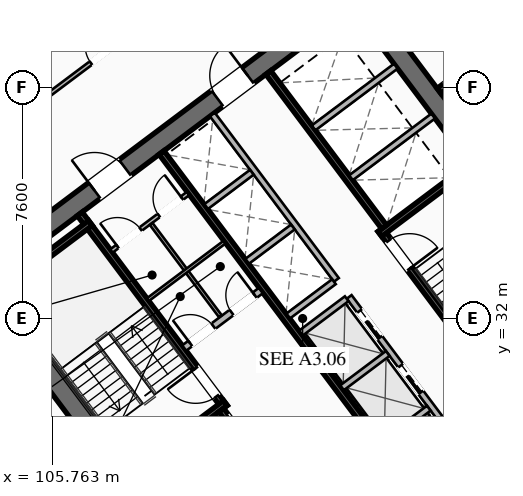
"""IFC4 building model, lengths in metres.
Left out: names, types, materials, properties, quantities, classifications, styles, units other than length and angle.
Written with IfcOpenShell. Run it as: python <this file> out.ifc"""

import sys

from ifc_helpers import new_model, si_unit, direction, frame, frame_2d, origin, place, context, subcontext, project, spatial, rectangle, extrude, element, fill, save


model = new_model("IFC4")
c1 = context("Model", 3, precision=1e-05, world=origin(), true_north=direction((0.0, 1.0)))
c2 = subcontext(c1, "Body", "Model", "MODEL_VIEW")
j1 = project(units=[si_unit("LENGTHUNIT", "METRE"), si_unit("PLANEANGLEUNIT", "RADIAN")], contexts=[c1])
p1 = place(None, origin())
s1 = spatial("IfcSite", under=j1, at=p1, CompositionType="ELEMENT")
p2 = place(p1, origin())
s2 = spatial("IfcBuilding", under=s1, at=p2, CompositionType="ELEMENT")
p3 = place(p2, frame((0.0, 0.0, 102.7)))
s3 = spatial("IfcBuildingStorey", under=s2, at=p3, CompositionType="ELEMENT", Elevation=102.7)
for number, where, z_axis, x_axis in (
    (1, (112.476, 21.107, 0.0), (0.0, 0.0, 1.0), (-0.6, 0.8, 0.0)),
    (2, (115.524, 42.893, 0.0), (0.0, 0.0, 1.0), (0.6, -0.8, 0.0)),
):
    element("IfcWall", number, at=place(p3, frame(where, z_axis=z_axis, x_axis=x_axis)), inside=s3, PredefinedType="SHEAR", context=c2, shape_type="SweptSolid", body=[
        extrude(rectangle(XDim=15.6, YDim=0.65, at=frame_2d((7.8, 0.0))), origin(), (0.0, 0.0, 1.0), 3.55),
    ])
p4 = place(p3, frame((124.429, 30.478, 0.0), z_axis=(0.0, 0.0, 1.0), x_axis=(-0.799998028465, -0.600002628705, 0.0)))
e3 = element("IfcWall", 3, at=p4, inside=s3, PredefinedType="SHEAR", context=c2, shape_type="SweptSolid", body=[
    extrude(rectangle(XDim=14.86, YDim=0.65, at=frame_2d((7.43, 0.0))), origin(), (0.0, 0.0, 1.0), 3.55),
])
p5 = place(p4, frame((9.13, 0.0, 0.0)))
e4 = element("IfcOpeningElement", 4, at=p5, cuts=e3, PredefinedType="OPENING", context=c2, shape_type="SweptSolid", body=[
    extrude(rectangle(XDim=1.25, YDim=2.25, at=frame_2d((0.625, 1.125))), frame((0.0, 0.335, 0.0), z_axis=(0.0, -1.0, 0.0), x_axis=(1.0, 0.0, 0.0)), (0.0, 0.0, 1.0), 0.67),
])
p6 = place(p4, frame((4.08, 0.0, 0.0)))
e5 = element("IfcOpeningElement", 5, at=p6, cuts=e3, PredefinedType="OPENING", context=c2, shape_type="SweptSolid", body=[
    extrude(rectangle(XDim=1.25, YDim=2.25, at=frame_2d((0.625, 1.125))), frame((0.0, 0.335, 0.0), z_axis=(0.0, -1.0, 0.0), x_axis=(1.0, 0.0, 0.0)), (0.0, 0.0, 1.0), 0.67),
])
p7 = place(p3, frame((103.571, 33.522, 0.0), z_axis=(0.0, 0.0, 1.0), x_axis=(0.799998028465, 0.600002628705, 0.0)))
e6 = element("IfcWall", 6, at=p7, inside=s3, PredefinedType="SHEAR", context=c2, shape_type="SweptSolid", body=[
    extrude(rectangle(XDim=14.86, YDim=0.65, at=frame_2d((7.43, 0.0))), origin(), (0.0, 0.0, 1.0), 3.55),
])
p8 = place(p7, frame((4.48, 0.0, 0.0)))
e7 = element("IfcOpeningElement", 7, at=p8, cuts=e6, PredefinedType="OPENING", context=c2, shape_type="SweptSolid", body=[
    extrude(rectangle(XDim=1.25, YDim=2.25, at=frame_2d((0.625, 1.125))), frame((0.0, 0.335, 0.0), z_axis=(0.0, -1.0, 0.0), x_axis=(1.0, 0.0, 0.0)), (0.0, 0.0, 1.0), 0.67),
])
p9 = place(p7, frame((9.53, 0.0, 0.0)))
e8 = element("IfcOpeningElement", 8, at=p9, cuts=e6, PredefinedType="OPENING", context=c2, shape_type="SweptSolid", body=[
    extrude(rectangle(XDim=1.25, YDim=2.25, at=frame_2d((0.625, 1.125))), frame((0.0, 0.335, 0.0), z_axis=(0.0, -1.0, 0.0), x_axis=(1.0, 0.0, 0.0)), (0.0, 0.0, 1.0), 0.67),
])
p10 = place(p3, frame((111.44, 29.08, 0.0), z_axis=(0.0, 0.0, 1.0), x_axis=(-0.600009827119, 0.799992629566, 0.0)))
e9 = element("IfcWall", 9, at=p10, inside=s3, PredefinedType="SHEAR", context=c2, shape_type="SweptSolid", body=[
    extrude(rectangle(XDim=7.95, YDim=0.2, at=frame_2d((3.975, 0.0))), origin(), (0.0, 0.0, 1.0), 3.35),
])
p11 = place(p10, frame((0.45, 0.0, 0.0)))
e10 = element("IfcOpeningElement", 10, at=p11, cuts=e9, PredefinedType="OPENING", context=c2, shape_type="SweptSolid", body=[
    extrude(rectangle(XDim=1.15, YDim=2.2, at=frame_2d((0.575, 1.1))), frame((0.0, 0.11, 0.0), z_axis=(0.0, -1.0, 0.0), x_axis=(1.0, 0.0, 0.0)), (0.0, 0.0, 1.0), 0.22),
])
for number, where, z_axis, x_axis in (
    (11, (108.476, 26.982, 0.0), (0.0, 0.0, 1.0), (0.8, 0.6, 0.0)),
    (12, (104.036, 32.902, 0.0), (0.0, 0.0, 1.0), (0.8, 0.6, 0.0)),
):
    element("IfcWall", number, at=place(p3, frame(where, z_axis=z_axis, x_axis=x_axis)), inside=s3, PredefinedType="SHEAR", context=c2, shape_type="SweptSolid", body=[
        extrude(rectangle(XDim=3.73, YDim=0.2, at=frame_2d((1.865, 0.0))), origin(), (0.0, 0.0, 1.0), 3.35),
    ])
p12 = place(p3, frame((116.56, 34.92, 0.0), z_axis=(0.0, 0.0, 1.0), x_axis=(0.600009827119, -0.799992629566, 0.0)))
e13 = element("IfcWall", 13, at=p12, inside=s3, PredefinedType="SHEAR", context=c2, shape_type="SweptSolid", body=[
    extrude(rectangle(XDim=7.95, YDim=0.2, at=frame_2d((3.975, 0.0))), origin(), (0.0, 0.0, 1.0), 3.35),
])
p13 = place(p12, frame((0.45, 0.0, 0.0)))
e14 = element("IfcOpeningElement", 14, at=p13, cuts=e13, PredefinedType="OPENING", context=c2, shape_type="SweptSolid", body=[
    extrude(rectangle(XDim=1.15, YDim=2.2, at=frame_2d((0.575, 1.1))), frame((0.0, 0.11, 0.0), z_axis=(0.0, -1.0, 0.0), x_axis=(1.0, 0.0, 0.0)), (0.0, 0.0, 1.0), 0.22),
])
p14 = place(p3, frame((116.54, 34.78, 0.0), z_axis=(0.0, 0.0, 1.0), x_axis=(0.799984290658, 0.600020945218, 0.0)))
e15 = element("IfcWall", 15, at=p14, inside=s3, PredefinedType="SHEAR", context=c2, shape_type="SweptSolid", body=[
    extrude(rectangle(XDim=3.73, YDim=0.2, at=frame_2d((1.865, 0.0))), origin(), (0.0, 0.0, 1.0), 3.35),
])
p15 = place(p3, frame((117.938, 26.016, 0.0), z_axis=(0.0, 0.0, 1.0), x_axis=(-0.600005463273, 0.799995902516, 0.0)))
e16 = element("IfcWall", 16, at=p15, inside=s3, PredefinedType="SHEAR", context=c2, shape_type="SweptSolid", body=[
    extrude(rectangle(XDim=14.3, YDim=0.2, at=frame_2d((7.15, 0.0))), origin(), (0.0, 0.0, 1.0), 3.35),
])
p16 = place(p3, frame((110.104, 31.028, 0.0), z_axis=(0.0, 0.0, 1.0), x_axis=(0.800018601094, 0.59997519774, 0.0)))
e17 = element("IfcWall", 17, at=p16, inside=s3, PredefinedType="SOLIDWALL", context=c2, shape_type="SweptSolid", body=[
    extrude(rectangle(XDim=3.15, YDim=0.22, at=frame_2d((1.575, 0.0))), origin(), (0.0, 0.0, 1.0), 2.703),
])
p17 = place(p16, frame((0.25, 0.0, 0.0)))
e18 = element("IfcOpeningElement", 18, at=p17, cuts=e17, PredefinedType="OPENING", context=c2, shape_type="SweptSolid", body=[
    extrude(rectangle(XDim=0.95, YDim=2.05, at=frame_2d((0.475, 1.025))), frame((0.0, 0.12, 0.0), z_axis=(0.0, -1.0, 0.0), x_axis=(1.0, 0.0, 0.0)), (0.0, 0.0, 1.0), 0.24),
])
p18 = place(p16, frame((1.95, 0.0, 0.0)))
e19 = element("IfcOpeningElement", 19, at=p18, cuts=e17, PredefinedType="OPENING", context=c2, shape_type="SweptSolid", body=[
    extrude(rectangle(XDim=0.95, YDim=2.05, at=frame_2d((0.475, 1.025))), frame((0.0, 0.12, 0.0), z_axis=(0.0, -1.0, 0.0), x_axis=(1.0, 0.0, 0.0)), (0.0, 0.0, 1.0), 0.24),
])
p19 = place(p3, frame((115.13, 23.91, 0.0), z_axis=(0.0, 0.0, 1.0), x_axis=(-0.599975393228, 0.800018454488, 0.0)))
e20 = element("IfcWall", 20, at=p19, inside=s3, PredefinedType="SHEAR", context=c2, shape_type="SweptSolid", body=[
    extrude(rectangle(XDim=6.35, YDim=0.2, at=frame_2d((3.175, 0.0))), origin(), (0.0, 0.0, 1.0), 3.35),
])
p20 = place(p19, frame((4.775, 0.0, 0.0)))
e21 = element("IfcOpeningElement", 21, at=p20, cuts=e20, PredefinedType="OPENING", context=c2, shape_type="SweptSolid", body=[
    extrude(rectangle(XDim=1.3, YDim=2.25, at=frame_2d((0.65, 1.125))), frame((0.0, 0.11, 0.0), z_axis=(0.0, -1.0, 0.0), x_axis=(1.0, 0.0, 0.0)), (0.0, 0.0, 1.0), 0.22),
])
p21 = place(p19, frame((2.775, 0.0, 0.0)))
e22 = element("IfcOpeningElement", 22, at=p21, cuts=e20, PredefinedType="OPENING", context=c2, shape_type="SweptSolid", body=[
    extrude(rectangle(XDim=1.3, YDim=2.25, at=frame_2d((0.65, 1.125))), frame((0.0, 0.11, 0.0), z_axis=(0.0, -1.0, 0.0), x_axis=(1.0, 0.0, 0.0)), (0.0, 0.0, 1.0), 0.22),
])
p22 = place(p19, frame((0.575, 0.0, 0.0)))
e23 = element("IfcOpeningElement", 23, at=p22, cuts=e20, PredefinedType="OPENING", context=c2, shape_type="SweptSolid", body=[
    extrude(rectangle(XDim=1.3, YDim=2.25, at=frame_2d((0.65, 1.125))), frame((0.0, 0.11, 0.0), z_axis=(0.0, -1.0, 0.0), x_axis=(1.0, 0.0, 0.0)), (0.0, 0.0, 1.0), 0.22),
])
p23 = place(p3, frame((112.87, 40.09, 0.0), z_axis=(0.0, 0.0, 1.0), x_axis=(0.599975393228, -0.800018454488, 0.0)))
e24 = element("IfcWall", 24, at=p23, inside=s3, PredefinedType="SHEAR", context=c2, shape_type="SweptSolid", body=[
    extrude(rectangle(XDim=6.35, YDim=0.2, at=frame_2d((3.175, 0.0))), origin(), (0.0, 0.0, 1.0), 3.35),
])
for number, where, z_axis, x_axis in (
    (25, (115.59, 36.63, 0.0), (0.0, 0.0, 1.0), (0.8, 0.6, 0.0)),
    (26, (114.36, 38.27, 0.0), (0.0, 0.0, 1.0), (0.8, 0.6, 0.0)),
):
    element("IfcWall", number, at=place(p3, frame(where, z_axis=z_axis, x_axis=x_axis)), inside=s3, PredefinedType="SOLIDWALL", context=c2, shape_type="SweptSolid", body=[
        extrude(rectangle(XDim=3.38, YDim=0.2, at=frame_2d((1.69, 0.0))), origin(), (0.0, 0.0, 1.0), 3.35),
    ])
p24 = place(p3, frame((107.71, 34.22, 0.0), z_axis=(0.0, 0.0, 1.0), x_axis=(0.799981399002, 0.60002480053, 0.0)))
e27 = element("IfcWall", 27, at=p24, inside=s3, PredefinedType="PARTITIONING", context=c2, shape_type="SweptSolid", body=[
    extrude(rectangle(XDim=3.15, YDim=0.135, at=frame_2d((1.575, 0.0))), origin(), (0.0, 0.0, 1.0), 2.703),
])
p25 = place(p24, frame((0.25, 0.0, 0.0)))
e28 = element("IfcOpeningElement", 28, at=p25, cuts=e27, PredefinedType="OPENING", context=c2, shape_type="SweptSolid", body=[
    extrude(rectangle(XDim=0.95, YDim=2.05, at=frame_2d((0.475, 1.025))), frame((0.0, 0.077, 0.0), z_axis=(0.0, -1.0, 0.0), x_axis=(1.0, 0.0, 0.0)), (0.0, 0.0, 1.0), 0.155),
])
p26 = place(p24, frame((1.95, 0.0, 0.0)))
e29 = element("IfcOpeningElement", 29, at=p26, cuts=e27, PredefinedType="OPENING", context=c2, shape_type="SweptSolid", body=[
    extrude(rectangle(XDim=0.95, YDim=2.05, at=frame_2d((0.475, 1.025))), frame((0.0, 0.077, 0.0), z_axis=(0.0, -1.0, 0.0), x_axis=(1.0, 0.0, 0.0)), (0.0, 0.0, 1.0), 0.155),
])
p27 = place(p3, frame((111.296, 32.072, 0.0), z_axis=(0.0, 0.0, 1.0), x_axis=(-0.59995887973, 0.800030838552, 0.0)))
e30 = element("IfcWall", 30, at=p27, inside=s3, PredefinedType="PARTITIONING", context=c2, shape_type="SweptSolid", body=[
    extrude(rectangle(XDim=3.8, YDim=0.11, at=frame_2d((1.9, 0.0))), origin(), (0.0, 0.0, 1.0), 2.703),
])
p28 = place(p3, frame((108.91, 32.62, 0.0), z_axis=(0.0, 0.0, 1.0), x_axis=(0.800018601094, 0.59997519774, 0.0)))
e31 = element("IfcWall", 31, at=p28, inside=s3, PredefinedType="PARTITIONING", context=c2, shape_type="SweptSolid", body=[
    extrude(rectangle(XDim=3.15, YDim=0.11, at=frame_2d((1.575, 0.0))), origin(), (0.0, 0.0, 1.0), 2.703),
])
p29 = place(p3, frame((119.61, 27.27, 0.0), z_axis=(0.0, 0.0, 1.0), x_axis=(-0.600011488909, 0.79999138319, 0.0)))
e32 = element("IfcWall", 32, at=p29, inside=s3, PredefinedType="SOLIDWALL", context=c2, shape_type="SweptSolid", body=[
    extrude(rectangle(XDim=6.8, YDim=0.2, at=frame_2d((3.4, 0.0))), origin(), (0.0, 0.0, 1.0), 3.35),
])
p30 = place(p29, frame((0.625, 0.0, 0.0)))
e33 = element("IfcOpeningElement", 33, at=p30, cuts=e32, PredefinedType="OPENING", context=c2, shape_type="SweptSolid", body=[
    extrude(rectangle(XDim=1.1, YDim=2.2, at=frame_2d((0.55, 1.1))), frame((0.0, 0.11, 0.0), z_axis=(0.0, -1.0, 0.0), x_axis=(1.0, 0.0, 0.0)), (0.0, 0.0, 1.0), 0.22),
])
p31 = place(p29, frame((2.875, 0.0, 0.0)))
e34 = element("IfcOpeningElement", 34, at=p31, cuts=e32, PredefinedType="OPENING", context=c2, shape_type="SweptSolid", body=[
    extrude(rectangle(XDim=1.1, YDim=2.2, at=frame_2d((0.55, 1.1))), frame((0.0, 0.11, 0.0), z_axis=(0.0, -1.0, 0.0), x_axis=(1.0, 0.0, 0.0)), (0.0, 0.0, 1.0), 0.22),
])
p32 = place(p29, frame((5.125, 0.0, 0.0)))
e35 = element("IfcOpeningElement", 35, at=p32, cuts=e32, PredefinedType="OPENING", context=c2, shape_type="SweptSolid", body=[
    extrude(rectangle(XDim=1.1, YDim=2.2, at=frame_2d((0.55, 1.1))), frame((0.0, 0.11, 0.0), z_axis=(0.0, -1.0, 0.0), x_axis=(1.0, 0.0, 0.0)), (0.0, 0.0, 1.0), 0.22),
])
p33 = place(p3, frame((116.646, 27.922, 0.0), z_axis=(0.0, 0.0, 1.0), x_axis=(0.8, 0.6, 0.0)))
e36 = element("IfcWall", 36, at=p33, inside=s3, PredefinedType="SOLIDWALL", context=c2, shape_type="SweptSolid", body=[
    extrude(rectangle(XDim=1.88, YDim=0.2, at=frame_2d((0.94, 0.0))), origin(), (0.0, 0.0, 1.0), 3.35),
])
p34 = place(p3, frame((115.296, 29.722, 0.0), z_axis=(0.0, 0.0, 1.0), x_axis=(0.799984418148, 0.600020775241, 0.0)))
e37 = element("IfcWall", 37, at=p34, inside=s3, PredefinedType="SOLIDWALL", context=c2, shape_type="SweptSolid", body=[
    extrude(rectangle(XDim=1.88, YDim=0.2, at=frame_2d((0.94, 0.0))), origin(), (0.0, 0.0, 1.0), 3.35),
])
p35 = place(p3, frame((113.946, 31.522, 0.0), z_axis=(0.0, 0.0, 1.0), x_axis=(0.8, 0.6, 0.0)))
e38 = element("IfcWall", 38, at=p35, inside=s3, PredefinedType="SOLIDWALL", context=c2, shape_type="SweptSolid", body=[
    extrude(rectangle(XDim=1.88, YDim=0.2, at=frame_2d((0.94, 0.0))), origin(), (0.0, 0.0, 1.0), 3.35),
])
p36 = place(p3, frame((115.11, 33.27, 0.0), z_axis=(0.0, 0.0, 1.0), x_axis=(-0.600011488909, 0.79999138319, 0.0)))
e39 = element("IfcWall", 39, at=p36, inside=s3, PredefinedType="SOLIDWALL", context=c2, shape_type="SweptSolid", body=[
    extrude(rectangle(XDim=6.8, YDim=0.2, at=frame_2d((3.4, 0.0))), origin(), (0.0, 0.0, 1.0), 3.35),
])
p37 = place(p3, frame((113.526, 32.082, 0.0), z_axis=(0.0, 0.0, 1.0), x_axis=(0.800046745961, 0.599937666993, 0.0)))
e40 = element("IfcWall", 40, at=p37, inside=s3, PredefinedType="SOLIDWALL", context=c2, shape_type="SweptSolid", body=[
    extrude(rectangle(XDim=1.88, YDim=0.2, at=frame_2d((0.94, 0.0))), origin(), (0.0, 0.0, 1.0), 3.35),
])
p38 = place(p3, frame((112.176, 33.882, 0.0), z_axis=(0.0, 0.0, 1.0), x_axis=(0.8, 0.6, 0.0)))
e41 = element("IfcWall", 41, at=p38, inside=s3, PredefinedType="SOLIDWALL", context=c2, shape_type="SweptSolid", body=[
    extrude(rectangle(XDim=1.88, YDim=0.2, at=frame_2d((0.94, 0.0))), origin(), (0.0, 0.0, 1.0), 3.35),
])
p39 = place(p3, frame((110.826, 35.682, 0.0), z_axis=(0.0, 0.0, 1.0), x_axis=(0.799984418148, 0.600020775241, 0.0)))
e42 = element("IfcWall", 42, at=p39, inside=s3, PredefinedType="SOLIDWALL", context=c2, shape_type="SweptSolid", body=[
    extrude(rectangle(XDim=1.88, YDim=0.2, at=frame_2d((0.94, 0.0))), origin(), (0.0, 0.0, 1.0), 3.35),
])
p40 = place(p3, frame((121.204, 41.528, 0.0), z_axis=(0.0, 0.0, 1.0), x_axis=(-0.800017232136, -0.599977023131, 0.0)))
e43 = element("IfcWall", 43, at=p40, inside=s3, PredefinedType="SHEAR", context=c2, shape_type="SweptSolid", body=[
    extrude(rectangle(XDim=3.4, YDim=0.2, at=frame_2d((1.7, 0.0))), origin(), (0.0, 0.0, 1.0), 3.35),
])
p41 = place(p40, frame((1.975, 0.0, 0.0)))
e44 = element("IfcOpeningElement", 44, at=p41, cuts=e43, PredefinedType="OPENING", context=c2, shape_type="SweptSolid", body=[
    extrude(rectangle(XDim=1.15, YDim=2.2, at=frame_2d((0.575, 1.1))), frame((0.0, 0.11, 0.0), z_axis=(0.0, -1.0, 0.0), x_axis=(1.0, 0.0, 0.0)), (0.0, 0.0, 1.0), 0.22),
])
p42 = place(p3, frame((119.824, 40.618, 0.0), z_axis=(0.0, 0.0, 1.0), x_axis=(-0.599982243973, 0.800013316712, 0.0)))
e45 = element("IfcWall", 45, at=p42, inside=s3, PredefinedType="PARTITIONING", context=c2, shape_type="SweptSolid", body=[
    extrude(rectangle(XDim=4.4, YDim=0.135, at=frame_2d((2.2, 0.0))), origin(), (0.0, 0.0, 1.0), 2.703),
])
p43 = place(p3, frame((98.316, 33.862, 0.0), z_axis=(0.0, 0.0, 1.0), x_axis=(0.8000041147, 0.599994513695, 0.0)))
e46 = element("IfcWall", 46, at=p43, inside=s3, PredefinedType="PARTITIONING", context=c2, shape_type="SweptSolid", body=[
    extrude(rectangle(XDim=28.48, YDim=0.135, at=frame_2d((14.24, 0.0))), origin(), (0.0, 0.0, 1.0), 2.703),
])
p44 = place(p43, frame((0.3, 0.0, 0.0)))
e47 = element("IfcOpeningElement", 47, at=p44, cuts=e46, PredefinedType="OPENING", context=c2, shape_type="SweptSolid", body=[
    extrude(rectangle(XDim=0.95, YDim=2.05, at=frame_2d((0.475, 1.025))), frame((0.0, 0.077, 0.0), z_axis=(0.0, -1.0, 0.0), x_axis=(1.0, 0.0, 0.0)), (0.0, 0.0, 1.0), 0.155),
])
p45 = place(p43, frame((10.9, 0.0, 0.0)))
e48 = element("IfcOpeningElement", 48, at=p45, cuts=e46, PredefinedType="OPENING", context=c2, shape_type="SweptSolid", body=[
    extrude(rectangle(XDim=0.95, YDim=2.05, at=frame_2d((0.475, 1.025))), frame((0.0, 0.077, 0.0), z_axis=(0.0, -1.0, 0.0), x_axis=(1.0, 0.0, 0.0)), (0.0, 0.0, 1.0), 0.155),
])
p46 = place(p43, frame((14.9, 0.0, 0.0)))
e49 = element("IfcOpeningElement", 49, at=p46, cuts=e46, PredefinedType="OPENING", context=c2, shape_type="SweptSolid", body=[
    extrude(rectangle(XDim=0.95, YDim=2.05, at=frame_2d((0.475, 1.025))), frame((0.0, 0.077, 0.0), z_axis=(0.0, -1.0, 0.0), x_axis=(1.0, 0.0, 0.0)), (0.0, 0.0, 1.0), 0.155),
])
p47 = place(p43, frame((27.23, 0.0, 0.0)))
e50 = element("IfcOpeningElement", 50, at=p47, cuts=e46, PredefinedType="OPENING", context=c2, shape_type="SweptSolid", body=[
    extrude(rectangle(XDim=0.95, YDim=2.05, at=frame_2d((0.475, 1.025))), frame((0.0, 0.077, 0.0), z_axis=(0.0, -1.0, 0.0), x_axis=(1.0, 0.0, 0.0)), (0.0, 0.0, 1.0), 0.155),
])
p48 = place(p3, frame((134.462, 33.134, 0.0), z_axis=(0.0, 0.0, 1.0), x_axis=(-0.799996913945, -0.600004114717, 0.0)))
e51 = element("IfcWall", 51, at=p48, inside=s3, PredefinedType="PARTITIONING", context=c2, shape_type="SweptSolid", body=[
    extrude(rectangle(XDim=28.48, YDim=0.135, at=frame_2d((14.24, 0.0))), origin(), (0.0, 0.0, 1.0), 2.703),
])
p49 = place(p48, frame((27.15, 0.0, 0.0)))
e52 = element("IfcOpeningElement", 52, at=p49, cuts=e51, PredefinedType="OPENING", context=c2, shape_type="SweptSolid", body=[
    extrude(rectangle(XDim=0.95, YDim=2.05, at=frame_2d((0.475, 1.025))), frame((0.0, 0.077, 0.0), z_axis=(0.0, -1.0, 0.0), x_axis=(1.0, 0.0, 0.0)), (0.0, 0.0, 1.0), 0.155),
])
p50 = place(p48, frame((16.321, 0.0, 0.0)))
e53 = element("IfcOpeningElement", 53, at=p50, cuts=e51, PredefinedType="OPENING", context=c2, shape_type="SweptSolid", body=[
    extrude(rectangle(XDim=0.95, YDim=2.05, at=frame_2d((0.475, 1.025))), frame((0.0, 0.077, 0.0), z_axis=(0.0, -1.0, 0.0), x_axis=(1.0, 0.0, 0.0)), (0.0, 0.0, 1.0), 0.155),
])
p51 = place(p48, frame((12.529, 0.0, 0.0)))
e54 = element("IfcOpeningElement", 54, at=p51, cuts=e51, PredefinedType="OPENING", context=c2, shape_type="SweptSolid", body=[
    extrude(rectangle(XDim=0.95, YDim=2.05, at=frame_2d((0.475, 1.025))), frame((0.0, 0.077, 0.0), z_axis=(0.0, -1.0, 0.0), x_axis=(1.0, 0.0, 0.0)), (0.0, 0.0, 1.0), 0.155),
])
p52 = place(p48, frame((0.38, 0.0, 0.0)))
e55 = element("IfcOpeningElement", 55, at=p52, cuts=e51, PredefinedType="OPENING", context=c2, shape_type="SweptSolid", body=[
    extrude(rectangle(XDim=0.95, YDim=2.05, at=frame_2d((0.475, 1.025))), frame((0.0, 0.077, 0.0), z_axis=(0.0, -1.0, 0.0), x_axis=(1.0, 0.0, 0.0)), (0.0, 0.0, 1.0), 0.155),
])
p53 = place(p3, frame((111.63, 16.11, 0.0), z_axis=(0.0, 0.0, 1.0), x_axis=(-0.599996466511, 0.800002650104, 0.0)))
e56 = element("IfcWall", 56, at=p53, inside=s3, PredefinedType="PARTITIONING", context=c2, shape_type="SweptSolid", body=[
    extrude(rectangle(XDim=22.11, YDim=0.135, at=frame_2d((11.055, 0.0))), origin(), (0.0, 0.0, 1.0), 2.703),
])
p54 = place(p53, frame((0.3, 0.0, 0.0)))
e57 = element("IfcOpeningElement", 57, at=p54, cuts=e56, PredefinedType="OPENING", context=c2, shape_type="SweptSolid", body=[
    extrude(rectangle(XDim=0.95, YDim=2.05, at=frame_2d((0.475, 1.025))), frame((0.0, 0.077, 0.0), z_axis=(0.0, -1.0, 0.0), x_axis=(1.0, 0.0, 0.0)), (0.0, 0.0, 1.0), 0.155),
])
p55 = place(p8, origin())
e58 = element("IfcDoor", 58, at=p55, inside=s3, OperationType="SINGLE_SWING_LEFT", PredefinedType="DOOR", context=c2, shape_type="SweptSolid", body=[
    extrude(rectangle(XDim=1.25, YDim=2.25, at=frame_2d((0.625, 1.125))), frame((0.0, 0.025, 0.0), z_axis=(0.0, -1.0, 0.0), x_axis=(1.0, 0.0, 0.0)), (0.0, 0.0, 1.0), 0.05),
])
fill(e7, e58)
p56 = place(p9, origin())
e59 = element("IfcDoor", 59, at=p56, inside=s3, OperationType="SINGLE_SWING_RIGHT", PredefinedType="DOOR", context=c2, shape_type="SweptSolid", body=[
    extrude(rectangle(XDim=1.25, YDim=2.25, at=frame_2d((0.625, 1.125))), frame((0.0, 0.025, 0.0), z_axis=(0.0, -1.0, 0.0), x_axis=(1.0, 0.0, 0.0)), (0.0, 0.0, 1.0), 0.05),
])
fill(e8, e59)
p57 = place(p11, origin())
e60 = element("IfcDoor", 60, at=p57, inside=s3, OperationType="SINGLE_SWING_RIGHT", PredefinedType="DOOR", context=c2, shape_type="SweptSolid", body=[
    extrude(rectangle(XDim=1.15, YDim=2.2, at=frame_2d((0.575, 1.1))), frame((0.0, 0.025, 0.0), z_axis=(0.0, -1.0, 0.0), x_axis=(1.0, 0.0, 0.0)), (0.0, 0.0, 1.0), 0.05),
])
fill(e10, e60)
p58 = place(p13, origin())
e61 = element("IfcDoor", 61, at=p58, inside=s3, OperationType="SINGLE_SWING_RIGHT", PredefinedType="DOOR", context=c2, shape_type="SweptSolid", body=[
    extrude(rectangle(XDim=1.15, YDim=2.2, at=frame_2d((0.575, 1.1))), frame((0.0, 0.025, 0.0), z_axis=(0.0, -1.0, 0.0), x_axis=(1.0, 0.0, 0.0)), (0.0, 0.0, 1.0), 0.05),
])
fill(e14, e61)
p59 = place(p25, origin())
e62 = element("IfcDoor", 62, at=p59, inside=s3, OperationType="SINGLE_SWING_LEFT", PredefinedType="DOOR", context=c2, shape_type="SweptSolid", body=[
    extrude(rectangle(XDim=0.95, YDim=2.05, at=frame_2d((0.475, 1.025))), frame((0.0, 0.025, 0.0), z_axis=(0.0, -1.0, 0.0), x_axis=(1.0, 0.0, 0.0)), (0.0, 0.0, 1.0), 0.05),
])
fill(e28, e62)
p60 = place(p26, origin())
e63 = element("IfcDoor", 63, at=p60, inside=s3, OperationType="SINGLE_SWING_RIGHT", PredefinedType="DOOR", context=c2, shape_type="SweptSolid", body=[
    extrude(rectangle(XDim=0.95, YDim=2.05, at=frame_2d((0.475, 1.025))), frame((0.0, 0.025, 0.0), z_axis=(0.0, -1.0, 0.0), x_axis=(1.0, 0.0, 0.0)), (0.0, 0.0, 1.0), 0.05),
])
fill(e29, e63)
p61 = place(p17, origin())
e64 = element("IfcDoor", 64, at=p61, inside=s3, OperationType="SINGLE_SWING_LEFT", PredefinedType="DOOR", context=c2, shape_type="SweptSolid", body=[
    extrude(rectangle(XDim=0.95, YDim=2.05, at=frame_2d((0.475, 1.025))), frame((0.0, 0.025, 0.0), z_axis=(0.0, -1.0, 0.0), x_axis=(1.0, 0.0, 0.0)), (0.0, 0.0, 1.0), 0.05),
])
fill(e18, e64)
p62 = place(p18, origin())
e65 = element("IfcDoor", 65, at=p62, inside=s3, OperationType="SINGLE_SWING_RIGHT", PredefinedType="DOOR", context=c2, shape_type="SweptSolid", body=[
    extrude(rectangle(XDim=0.95, YDim=2.05, at=frame_2d((0.475, 1.025))), frame((0.0, 0.025, 0.0), z_axis=(0.0, -1.0, 0.0), x_axis=(1.0, 0.0, 0.0)), (0.0, 0.0, 1.0), 0.05),
])
fill(e19, e65)
p63 = place(p45, origin())
e66 = element("IfcDoor", 66, at=p63, inside=s3, OperationType="SINGLE_SWING_RIGHT", PredefinedType="DOOR", context=c2, shape_type="SweptSolid", body=[
    extrude(rectangle(XDim=0.95, YDim=2.05, at=frame_2d((0.475, 1.025))), frame((0.0, 0.025, 0.0), z_axis=(0.0, -1.0, 0.0), x_axis=(1.0, 0.0, 0.0)), (0.0, 0.0, 1.0), 0.05),
])
fill(e48, e66)
p64 = place(p31, origin())
e67 = element("IfcDoor", 67, at=p64, inside=s3, OperationType="SLIDING_TO_LEFT", PredefinedType="DOOR", context=c2, shape_type="SweptSolid", body=[
    extrude(rectangle(XDim=1.1, YDim=2.2, at=frame_2d((0.55, 1.1))), frame((0.0, 0.025, 0.0), z_axis=(0.0, -1.0, 0.0), x_axis=(1.0, 0.0, 0.0)), (0.0, 0.0, 1.0), 0.05),
])
fill(e34, e67)
p65 = place(p32, origin())
e68 = element("IfcDoor", 68, at=p65, inside=s3, OperationType="SLIDING_TO_LEFT", PredefinedType="DOOR", context=c2, shape_type="SweptSolid", body=[
    extrude(rectangle(XDim=1.1, YDim=2.2, at=frame_2d((0.55, 1.1))), frame((0.0, 0.025, 0.0), z_axis=(0.0, -1.0, 0.0), x_axis=(1.0, 0.0, 0.0)), (0.0, 0.0, 1.0), 0.05),
])
fill(e35, e68)
save(model, sys.argv[1])
